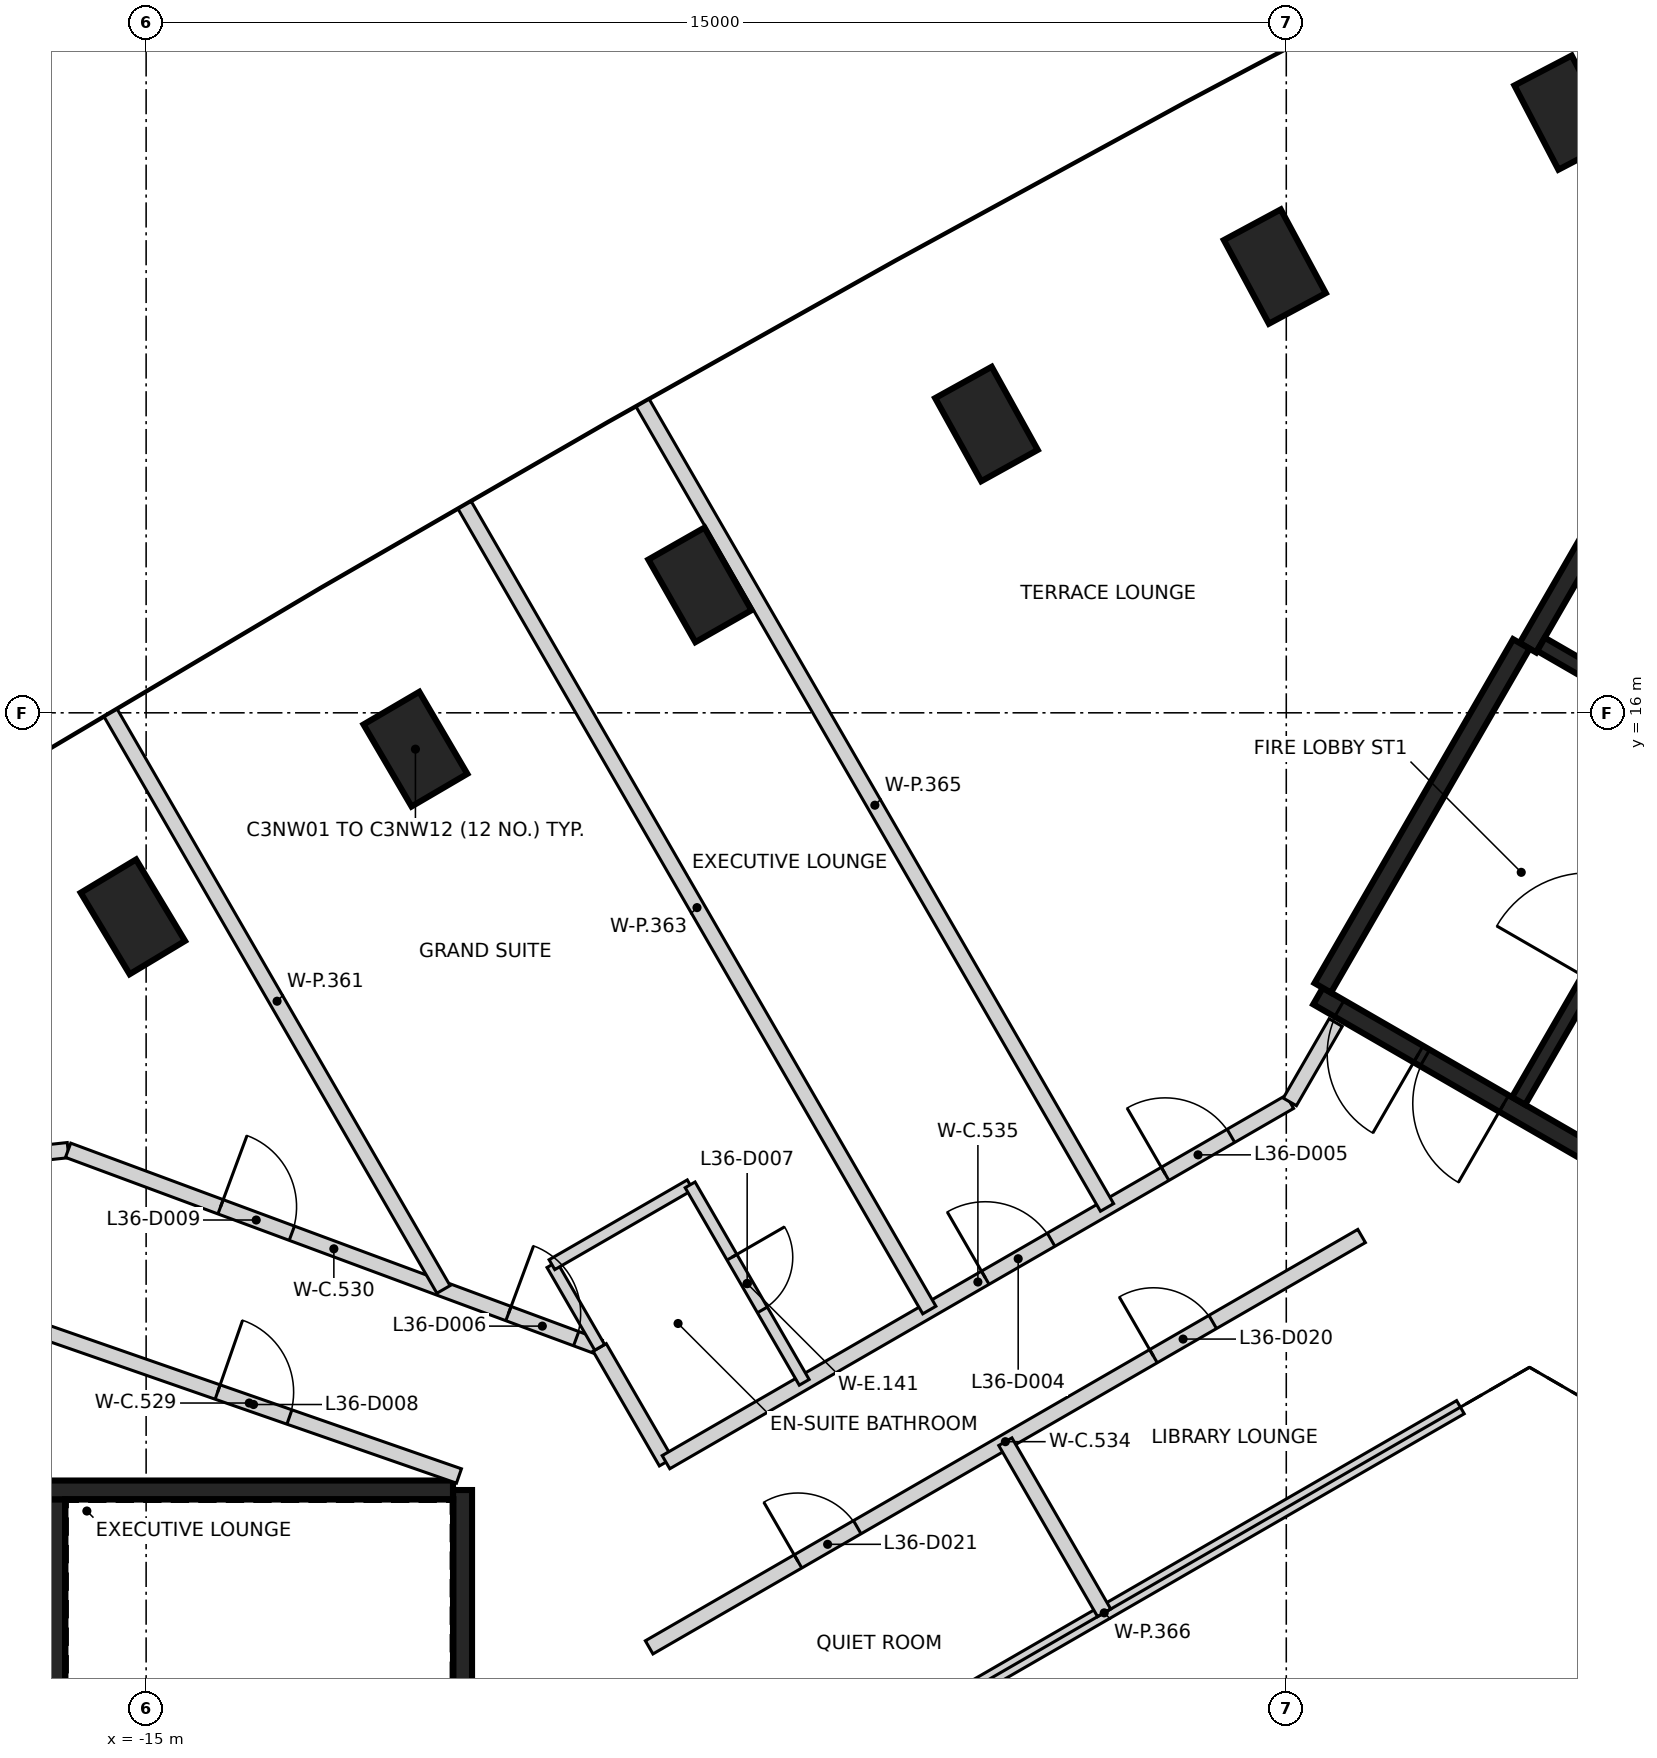
"""IFC4 building model, lengths in metres.
Left out: names, types, materials, properties, quantities, classifications, styles, units other than length and angle.
Written with IfcOpenShell. Run it as: python <this file> out.ifc"""

import sys

from ifc_helpers import new_model, si_unit, direction, frame, frame_2d, origin, origin_2d, place, context, subcontext, project, spatial, rectangle, extrude, element, fill, save


model = new_model("IFC4")
c1 = context("Model", 3, precision=1e-05, world=origin(), true_north=direction((0.0, 1.0)))
c2 = subcontext(c1, "Body", "Model", "MODEL_VIEW")
j1 = project(units=[si_unit("LENGTHUNIT", "METRE"), si_unit("PLANEANGLEUNIT", "RADIAN")], contexts=[c1])
p1 = place(None, origin())
s1 = spatial("IfcSite", under=j1, at=p1, CompositionType="ELEMENT")
p2 = place(p1, origin())
s2 = spatial("IfcBuilding", under=s1, at=p2, CompositionType="ELEMENT")
p3 = place(p2, frame((0.0, 0.0, 146.8)))
s3 = spatial("IfcBuildingStorey", under=s2, at=p3, CompositionType="ELEMENT", Elevation=146.8)
for number, where, z_axis, x_axis in (
    (1, (3.667, 23.896, -0.4), (0.0, 0.0, 1.0), (-0.463, 0.886, 0.0)),
    (2, (-0.151, 21.871, -0.4), (0.0, 0.0, 1.0), (-0.474, 0.881, 0.0)),
    (3, (-3.945, 19.8, -0.4), (0.0, 0.0, 1.0), (-0.485, 0.875, 0.0)),
    (4, (-7.714, 17.683, -0.4), (0.0, 0.0, 1.0), (-0.495, 0.869, 0.0)),
    (5, (-11.457, 15.522, -0.4), (0.0, 0.0, 1.0), (-0.505, 0.863, 0.0)),
    (6, (-15.175, 13.316, -0.4), (0.0, 0.0, 1.0), (-0.515, 0.857, 0.0)),
):
    element("IfcColumn", number, at=place(p3, frame(where, z_axis=z_axis, x_axis=x_axis)), inside=s3, PredefinedType="COLUMN", context=c2, shape_type="SweptSolid", body=[
        extrude(rectangle(XDim=1.25, YDim=0.85, at=origin_2d()), origin(), (0.0, 0.0, 1.0), 3.6),
    ])
p4 = place(p3, frame((-10.837, 5.775, 0.0), z_axis=(0.0, 0.0, 1.0), x_axis=(0.0, -1.0, 0.0)))
e7 = element("IfcWall", 7, at=p4, inside=s3, PredefinedType="SHEAR", context=c2, shape_type="SweptSolid", body=[
    extrude(rectangle(XDim=11.55, YDim=0.25, at=frame_2d((5.775, 0.0))), origin(), (0.0, 0.0, 1.0), 3.2),
])
p5 = place(p4, frame((10.025, 0.0, 0.0)))
e8 = element("IfcOpeningElement", 8, at=p5, cuts=e7, PredefinedType="OPENING", context=c2, shape_type="SweptSolid", body=[
    extrude(rectangle(XDim=1.2, YDim=2.1, at=frame_2d((0.6, 1.05))), frame((0.0, 0.135, 0.0), z_axis=(0.0, -1.0, 0.0), x_axis=(1.0, 0.0, 0.0)), (0.0, 0.0, 1.0), 0.27),
])
p6 = place(p4, frame((8.725, 0.0, 0.0)))
e9 = element("IfcOpeningElement", 9, at=p6, cuts=e7, PredefinedType="OPENING", context=c2, shape_type="SweptSolid", body=[
    extrude(rectangle(XDim=1.2, YDim=2.1, at=frame_2d((0.6, 1.05))), frame((0.0, 0.135, 0.0), z_axis=(0.0, -1.0, 0.0), x_axis=(1.0, 0.0, 0.0)), (0.0, 0.0, 1.0), 0.27),
])
p7 = place(p3, frame((-16.472, 5.775, 0.0), z_axis=(0.0, 0.0, 1.0), x_axis=(1.0, 0.0, 0.0)))
e10 = element("IfcWall", 10, at=p7, inside=s3, PredefinedType="SHEAR", context=c2, shape_type="SweptSolid", body=[
    extrude(rectangle(XDim=5.51, YDim=0.25, at=frame_2d((2.755, 0.0))), origin(), (0.0, 0.0, 1.0), 3.2),
])
p8 = place(p3, frame((-16.187, 3.2, 0.0), z_axis=(0.0, 0.0, 1.0), x_axis=(0.0, 1.0, 0.0)))
e11 = element("IfcWall", 11, at=p8, inside=s3, PredefinedType="SHEAR", context=c2, shape_type="SweptSolid", body=[
    extrude(rectangle(XDim=2.449, YDim=0.25, at=frame_2d((1.225, 0.0))), origin(), (0.0, 0.0, 1.0), 3.2),
])
p9 = place(p3, frame((10.42, 6.498, 0.0), z_axis=(0.0, 0.0, 1.0), x_axis=(-0.866021906294, 0.500006057782, 0.0)))
e12 = element("IfcWall", 12, at=p9, inside=s3, PredefinedType="SHEAR", context=c2, shape_type="SweptSolid", body=[
    extrude(rectangle(XDim=11.55, YDim=0.25, at=frame_2d((5.775, 0.0))), origin(), (0.0, 0.0, 1.0), 3.2),
])
p10 = place(p9, frame((10.025, 0.0, 0.0)))
e13 = element("IfcOpeningElement", 13, at=p10, cuts=e12, PredefinedType="OPENING", context=c2, shape_type="SweptSolid", body=[
    extrude(rectangle(XDim=1.2, YDim=2.1, at=frame_2d((0.6, 1.05))), frame((0.0, 0.135, 0.0), z_axis=(0.0, -1.0, 0.0), x_axis=(1.0, 0.0, 0.0)), (0.0, 0.0, 1.0), 0.27),
])
p11 = place(p9, frame((8.725, 0.0, 0.0)))
e14 = element("IfcOpeningElement", 14, at=p11, cuts=e12, PredefinedType="OPENING", context=c2, shape_type="SweptSolid", body=[
    extrude(rectangle(XDim=1.2, YDim=2.1, at=frame_2d((0.6, 1.05))), frame((0.0, 0.135, 0.0), z_axis=(0.0, -1.0, 0.0), x_axis=(1.0, 0.0, 0.0)), (0.0, 0.0, 1.0), 0.27),
])
p12 = place(p3, frame((3.179, 16.856, 0.0), z_axis=(0.0, 0.0, 1.0), x_axis=(0.500004234368, 0.866022959057, 0.0)))
e15 = element("IfcWall", 15, at=p12, inside=s3, PredefinedType="SHEAR", context=c2, shape_type="SweptSolid", body=[
    extrude(rectangle(XDim=6.25, YDim=0.25, at=frame_2d((3.125, 0.0))), origin(), (0.0, 0.0, 1.0), 3.2),
])
p13 = place(p3, frame((0.48, 12.381, 0.0), z_axis=(0.0, 0.0, 1.0), x_axis=(0.49999885962, 0.866026062182, 0.0)))
e16 = element("IfcWall", 16, at=p13, inside=s3, PredefinedType="SHEAR", context=c2, shape_type="SweptSolid", body=[
    extrude(rectangle(XDim=5.225, YDim=0.25, at=frame_2d((2.612, 0.0))), origin(), (0.0, 0.0, 1.0), 3.2),
])
p14 = place(p3, frame((3.057, 10.895, 0.0), z_axis=(0.0, 0.0, 1.0), x_axis=(0.499989418164, 0.866031513124, 0.0)))
e17 = element("IfcWall", 17, at=p14, inside=s3, PredefinedType="SHEAR", context=c2, shape_type="SweptSolid", body=[
    extrude(rectangle(XDim=5.251, YDim=0.2, at=frame_2d((2.625, 0.0))), origin(), (0.0, 0.0, 1.0), 3.2),
])
p15 = place(p14, frame((1.849, 0.0, 0.0)))
e18 = element("IfcOpeningElement", 18, at=p15, cuts=e17, PredefinedType="OPENING", context=c2, shape_type="SweptSolid", body=[
    extrude(rectangle(XDim=1.4, YDim=2.1, at=frame_2d((0.7, 1.05))), frame((0.0, 0.11, 0.0), z_axis=(0.0, -1.0, 0.0), x_axis=(1.0, 0.0, 0.0)), (0.0, 0.0, 1.0), 0.22),
])
p16 = place(p3, frame((5.725, 15.531, 0.0), z_axis=(0.0, 0.0, 1.0), x_axis=(-0.866037306777, 0.499979382845, 0.0)))
e19 = element("IfcWall", 19, at=p16, inside=s3, PredefinedType="SHEAR", context=c2, shape_type="SweptSolid", body=[
    extrude(rectangle(XDim=2.742, YDim=0.2, at=frame_2d((1.371, 0.0))), origin(), (0.0, 0.0, 1.0), 3.2),
])
p17 = place(p16, frame((0.743, 0.0, 0.0)))
e20 = element("IfcOpeningElement", 20, at=p17, cuts=e19, PredefinedType="OPENING", context=c2, shape_type="SweptSolid", body=[
    extrude(rectangle(XDim=1.3, YDim=2.1, at=frame_2d((0.65, 1.05))), frame((0.0, 0.11, 0.0), z_axis=(0.0, -1.0, 0.0), x_axis=(1.0, 0.0, 0.0)), (0.0, 0.0, 1.0), 0.22),
])
p18 = place(p3, frame((-18.865, 9.941, 0.0), z_axis=(0.0, 0.0, 1.0), x_axis=(0.99423123086, 0.107257911519, 0.0)))
e21 = element("IfcWall", 21, at=p18, inside=s3, PredefinedType="PARTITIONING", context=c2, shape_type="SweptSolid", body=[
    extrude(rectangle(XDim=2.854, YDim=0.2, at=frame_2d((1.427, 0.0))), origin(), (0.0, 0.0, 1.0), 3.2),
])
p19 = place(p3, frame((-16.402, 7.879, 0.0), z_axis=(0.0, 0.0, 1.0), x_axis=(0.94449961557, -0.328512520596, 0.0)))
e22 = element("IfcWall", 22, at=p19, inside=s3, PredefinedType="PARTITIONING", context=c2, shape_type="SweptSolid", body=[
    extrude(rectangle(XDim=5.842, YDim=0.2, at=frame_2d((2.921, 0.0))), origin(), (0.0, 0.0, 1.0), 3.2),
])
p20 = place(p19, frame((2.481, 0.0, 0.0)))
e23 = element("IfcOpeningElement", 23, at=p20, cuts=e22, PredefinedType="OPENING", context=c2, shape_type="SweptSolid", body=[
    extrude(rectangle(XDim=1.0, YDim=2.1, at=frame_2d((0.5, 1.05))), frame((0.0, 0.11, 0.0), z_axis=(0.0, -1.0, 0.0), x_axis=(1.0, 0.0, 0.0)), (0.0, 0.0, 1.0), 0.22),
])
p21 = place(p3, frame((-16.026, 10.245, 0.0), z_axis=(0.0, 0.0, 1.0), x_axis=(0.937607706988, -0.347694963721, 0.0)))
e24 = element("IfcWall", 24, at=p21, inside=s3, PredefinedType="PARTITIONING", context=c2, shape_type="SweptSolid", body=[
    extrude(rectangle(XDim=7.458, YDim=0.2, at=frame_2d((3.729, 0.0))), origin(), (0.0, 0.0, 1.0), 3.2),
])
p22 = place(p21, frame((6.179, 0.0, 0.0)))
e25 = element("IfcOpeningElement", 25, at=p22, cuts=e24, PredefinedType="OPENING", context=c2, shape_type="SweptSolid", body=[
    extrude(rectangle(XDim=0.95, YDim=2.1, at=frame_2d((0.475, 1.05))), frame((0.0, 0.11, 0.0), z_axis=(0.0, -1.0, 0.0), x_axis=(1.0, 0.0, 0.0)), (0.0, 0.0, 1.0), 0.22),
])
p23 = place(p21, frame((2.139, 0.0, 0.0)))
e26 = element("IfcOpeningElement", 26, at=p23, cuts=e24, PredefinedType="OPENING", context=c2, shape_type="SweptSolid", body=[
    extrude(rectangle(XDim=1.0, YDim=2.1, at=frame_2d((0.5, 1.05))), frame((0.0, 0.11, 0.0), z_axis=(0.0, -1.0, 0.0), x_axis=(1.0, 0.0, 0.0)), (0.0, 0.0, 1.0), 0.22),
])
p24 = place(p3, frame((-9.033, 7.651, 0.0), z_axis=(0.0, 0.0, 1.0), x_axis=(0.500417633986, -0.865784148386, 0.0)))
e27 = element("IfcWall", 27, at=p24, inside=s3, PredefinedType="PARTITIONING", context=c2, shape_type="SweptSolid", body=[
    extrude(rectangle(XDim=1.743, YDim=0.2, at=frame_2d((0.871, 0.0))), origin(), (0.0, 0.0, 1.0), 3.2),
])
p25 = place(p3, frame((-8.382, 3.705, 0.0), z_axis=(0.0, 0.0, 1.0), x_axis=(0.866012036978, 0.500023151273, 0.0)))
e28 = element("IfcWall", 28, at=p25, inside=s3, PredefinedType="PARTITIONING", context=c2, shape_type="SweptSolid", body=[
    extrude(rectangle(XDim=10.823, YDim=0.2, at=frame_2d((5.412, 0.0))), origin(), (0.0, 0.0, 1.0), 3.2),
])
p26 = place(p25, frame((7.661, 0.0, 0.0)))
e29 = element("IfcOpeningElement", 29, at=p26, cuts=e28, PredefinedType="OPENING", context=c2, shape_type="SweptSolid", body=[
    extrude(rectangle(XDim=0.9, YDim=2.1, at=frame_2d((0.45, 1.05))), frame((0.0, 0.11, 0.0), z_axis=(0.0, -1.0, 0.0), x_axis=(1.0, 0.0, 0.0)), (0.0, 0.0, 1.0), 0.22),
])
p27 = place(p25, frame((2.261, 0.0, 0.0)))
e30 = element("IfcOpeningElement", 30, at=p27, cuts=e28, PredefinedType="OPENING", context=c2, shape_type="SweptSolid", body=[
    extrude(rectangle(XDim=0.9, YDim=2.1, at=frame_2d((0.45, 1.05))), frame((0.0, 0.11, 0.0), z_axis=(0.0, -1.0, 0.0), x_axis=(1.0, 0.0, 0.0)), (0.0, 0.0, 1.0), 0.22),
])
p28 = place(p3, frame((-8.161, 6.142, 0.0), z_axis=(0.0, 0.0, 1.0), x_axis=(0.865927304867, 0.500169873828, 0.0)))
e31 = element("IfcWall", 31, at=p28, inside=s3, PredefinedType="PARTITIONING", context=c2, shape_type="SweptSolid", body=[
    extrude(rectangle(XDim=9.478, YDim=0.2, at=frame_2d((4.739, 0.0))), origin(), (0.0, 0.0, 1.0), 3.2),
])
p29 = place(p28, frame((4.851, 0.0, 0.0)))
e32 = element("IfcOpeningElement", 32, at=p29, cuts=e31, PredefinedType="OPENING", context=c2, shape_type="SweptSolid", body=[
    extrude(rectangle(XDim=1.0, YDim=2.1, at=frame_2d((0.5, 1.05))), frame((0.0, 0.11, 0.0), z_axis=(0.0, -1.0, 0.0), x_axis=(1.0, 0.0, 0.0)), (0.0, 0.0, 1.0), 0.22),
])
p30 = place(p28, frame((7.583, 0.0, 0.0)))
e33 = element("IfcOpeningElement", 33, at=p30, cuts=e31, PredefinedType="OPENING", context=c2, shape_type="SweptSolid", body=[
    extrude(rectangle(XDim=1.0, YDim=2.1, at=frame_2d((0.5, 1.05))), frame((0.0, 0.11, 0.0), z_axis=(0.0, -1.0, 0.0), x_axis=(1.0, 0.0, 0.0)), (0.0, 0.0, 1.0), 0.22),
])
p31 = place(p3, frame((0.047, 10.881, 0.0), z_axis=(0.0, 0.0, 1.0), x_axis=(0.500038011057, 0.866003456978, 0.0)))
e34 = element("IfcWall", 34, at=p31, inside=s3, PredefinedType="PARTITIONING", context=c2, shape_type="SweptSolid", body=[
    extrude(rectangle(XDim=1.206, YDim=0.2, at=frame_2d((0.603, 0.0))), origin(), (0.0, 0.0, 1.0), 3.2),
])
p32 = place(p3, frame((-15.467, 15.998, 0.0), z_axis=(0.0, 0.0, 1.0), x_axis=(0.500003998589, -0.866023095186, 0.0)))
e35 = element("IfcWall", 35, at=p32, inside=s3, PredefinedType="PARTITIONING", context=c2, shape_type="SweptSolid", body=[
    extrude(rectangle(XDim=8.757, YDim=0.2, at=frame_2d((4.379, 0.0))), origin(), (0.0, 0.0, 1.0), 2.3),
])
p33 = place(p3, frame((-10.809, 18.731, 0.0), z_axis=(0.0, 0.0, 1.0), x_axis=(0.500004774777, -0.866022647048, 0.0)))
e36 = element("IfcWall", 36, at=p33, inside=s3, PredefinedType="PARTITIONING", context=c2, shape_type="SweptSolid", body=[
    extrude(rectangle(XDim=12.227, YDim=0.2, at=frame_2d((6.113, 0.0))), origin(), (0.0, 0.0, 1.0), 2.3),
])
p34 = place(p3, frame((-8.468, 20.076, 0.0), z_axis=(0.0, 0.0, 1.0), x_axis=(0.499961688474, -0.866047521824, 0.0)))
e37 = element("IfcWall", 37, at=p34, inside=s3, PredefinedType="PARTITIONING", context=c2, shape_type="SweptSolid", body=[
    extrude(rectangle(XDim=12.22, YDim=0.2, at=frame_2d((6.11, 0.0))), origin(), (0.0, 0.0, 1.0), 2.3),
])
p35 = place(p3, frame((-7.082, 1.453, 0.0), z_axis=(0.0, 0.0, 1.0), x_axis=(0.866010525116, 0.500025769724, 0.0)))
e38 = element("IfcWall", 38, at=p35, inside=s3, PredefinedType="PARTITIONING", context=c2, shape_type="SweptSolid", body=[
    extrude(rectangle(XDim=10.823, YDim=0.2, at=frame_2d((5.411, 0.0))), origin(), (0.0, 0.0, 1.0), 2.3),
])
p36 = place(p3, frame((-3.696, 6.411, 0.0), z_axis=(0.0, 0.0, 1.0), x_axis=(0.500006934395, -0.866021400173, 0.0)))
e39 = element("IfcWall", 39, at=p36, inside=s3, PredefinedType="PARTITIONING", context=c2, shape_type="SweptSolid", body=[
    extrude(rectangle(XDim=2.6, YDim=0.2, at=frame_2d((1.3, 0.0))), origin(), (0.0, 0.0, 1.0), 2.3),
])
p37 = place(p3, frame((-9.661, 8.74, 0.0), z_axis=(0.0, 0.0, 1.0), x_axis=(0.49990192124, -0.866082022179, 0.0)))
e40 = element("IfcWall", 40, at=p37, inside=s3, PredefinedType="PARTITIONING", context=c2, shape_type="SweptSolid", body=[
    extrude(rectangle(XDim=1.256, YDim=0.15, at=frame_2d((0.628, 0.0))), origin(), (0.0, 0.0, 1.0), 3.2),
])
p38 = place(p3, frame((-9.661, 8.74, 0.0), z_axis=(0.0, 0.0, 1.0), x_axis=(0.865922159541, 0.500178781653, 0.0)))
e41 = element("IfcWall", 41, at=p38, inside=s3, PredefinedType="PARTITIONING", context=c2, shape_type="SweptSolid", body=[
    extrude(rectangle(XDim=2.099, YDim=0.15, at=frame_2d((1.05, 0.0))), origin(), (0.0, 0.0, 1.0), 3.2),
])
p39 = place(p3, frame((-7.843, 9.79, 0.0), z_axis=(0.0, 0.0, 1.0), x_axis=(0.500234218456, -0.865890135459, 0.0)))
e42 = element("IfcWall", 42, at=p39, inside=s3, PredefinedType="PARTITIONING", context=c2, shape_type="SweptSolid", body=[
    extrude(rectangle(XDim=3.0, YDim=0.15, at=frame_2d((1.5, 0.0))), origin(), (0.0, 0.0, 1.0), 3.2),
])
p40 = place(p39, frame((1.1, 0.0, 0.0)))
e43 = element("IfcOpeningElement", 43, at=p40, cuts=e42, PredefinedType="OPENING", context=c2, shape_type="SweptSolid", body=[
    extrude(rectangle(XDim=0.8, YDim=2.1, at=frame_2d((0.4, 1.05))), frame((0.0, 0.085, 0.0), z_axis=(0.0, -1.0, 0.0), x_axis=(1.0, 0.0, 0.0)), (0.0, 0.0, 1.0), 0.17),
])
p41 = place(p10, origin())
e44 = element("IfcDoor", 44, at=p41, inside=s3, OperationType="SINGLE_SWING_LEFT", PredefinedType="DOOR", context=c2, shape_type="SweptSolid", body=[
    extrude(rectangle(XDim=1.2, YDim=2.1, at=frame_2d((0.6, 1.05))), frame((0.0, 0.025, 0.0), z_axis=(0.0, -1.0, 0.0), x_axis=(1.0, 0.0, 0.0)), (0.0, 0.0, 1.0), 0.05),
])
fill(e13, e44)
p42 = place(p11, origin())
e45 = element("IfcDoor", 45, at=p42, inside=s3, OperationType="SINGLE_SWING_RIGHT", PredefinedType="DOOR", context=c2, shape_type="SweptSolid", body=[
    extrude(rectangle(XDim=1.2, YDim=2.1, at=frame_2d((0.6, 1.05))), frame((0.0, 0.025, 0.0), z_axis=(0.0, -1.0, 0.0), x_axis=(1.0, 0.0, 0.0)), (0.0, 0.0, 1.0), 0.05),
])
fill(e14, e45)
p43 = place(p29, origin())
e46 = element("IfcDoor", 46, at=p43, inside=s3, OperationType="SINGLE_SWING_LEFT", PredefinedType="DOOR", context=c2, shape_type="SweptSolid", body=[
    extrude(rectangle(XDim=1.0, YDim=2.1, at=frame_2d((0.5, 1.05))), frame((0.0, 0.025, 0.0), z_axis=(0.0, -1.0, 0.0), x_axis=(1.0, 0.0, 0.0)), (0.0, 0.0, 1.0), 0.05),
])
fill(e32, e46)
p44 = place(p30, origin())
e47 = element("IfcDoor", 47, at=p44, inside=s3, OperationType="SINGLE_SWING_LEFT", PredefinedType="DOOR", context=c2, shape_type="SweptSolid", body=[
    extrude(rectangle(XDim=1.0, YDim=2.1, at=frame_2d((0.5, 1.05))), frame((0.0, 0.025, 0.0), z_axis=(0.0, -1.0, 0.0), x_axis=(1.0, 0.0, 0.0)), (0.0, 0.0, 1.0), 0.05),
])
fill(e33, e47)
p45 = place(p22, origin())
e48 = element("IfcDoor", 48, at=p45, inside=s3, OperationType="SINGLE_SWING_LEFT", PredefinedType="DOOR", context=c2, shape_type="SweptSolid", body=[
    extrude(rectangle(XDim=0.95, YDim=2.1, at=frame_2d((0.475, 1.05))), frame((0.0, 0.025, 0.0), z_axis=(0.0, -1.0, 0.0), x_axis=(1.0, 0.0, 0.0)), (0.0, 0.0, 1.0), 0.05),
])
fill(e25, e48)
p46 = place(p40, frame((0.8, 0.0, 0.0), z_axis=(0.0, 0.0, 1.0), x_axis=(-1.0, 0.0, 0.0)))
e49 = element("IfcDoor", 49, at=p46, inside=s3, OperationType="SINGLE_SWING_LEFT", PredefinedType="DOOR", context=c2, shape_type="SweptSolid", body=[
    extrude(rectangle(XDim=0.8, YDim=2.1, at=frame_2d((0.4, 1.05))), frame((0.0, 0.025, 0.0), z_axis=(0.0, -1.0, 0.0), x_axis=(1.0, 0.0, 0.0)), (0.0, 0.0, 1.0), 0.05),
])
fill(e43, e49)
p47 = place(p20, frame((1.0, 0.0, 0.0), z_axis=(0.0, 0.0, 1.0), x_axis=(-1.0, 0.0, 0.0)))
e50 = element("IfcDoor", 50, at=p47, inside=s3, OperationType="SINGLE_SWING_LEFT", PredefinedType="DOOR", context=c2, shape_type="SweptSolid", body=[
    extrude(rectangle(XDim=1.0, YDim=2.1, at=frame_2d((0.5, 1.05))), frame((0.0, 0.025, 0.0), z_axis=(0.0, -1.0, 0.0), x_axis=(1.0, 0.0, 0.0)), (0.0, 0.0, 1.0), 0.05),
])
fill(e23, e50)
p48 = place(p23, frame((1.0, 0.0, 0.0), z_axis=(0.0, 0.0, 1.0), x_axis=(-1.0, 0.0, 0.0)))
e51 = element("IfcDoor", 51, at=p48, inside=s3, OperationType="SINGLE_SWING_LEFT", PredefinedType="DOOR", context=c2, shape_type="SweptSolid", body=[
    extrude(rectangle(XDim=1.0, YDim=2.1, at=frame_2d((0.5, 1.05))), frame((0.0, 0.025, 0.0), z_axis=(0.0, -1.0, 0.0), x_axis=(1.0, 0.0, 0.0)), (0.0, 0.0, 1.0), 0.05),
])
fill(e26, e51)
p49 = place(p26, frame((0.9, 0.0, 0.0), z_axis=(0.0, 0.0, 1.0), x_axis=(-1.0, 0.0, 0.0)))
e52 = element("IfcDoor", 52, at=p49, inside=s3, OperationType="SINGLE_SWING_LEFT", PredefinedType="DOOR", context=c2, shape_type="SweptSolid", body=[
    extrude(rectangle(XDim=0.9, YDim=2.1, at=frame_2d((0.45, 1.05))), frame((0.0, 0.025, 0.0), z_axis=(0.0, -1.0, 0.0), x_axis=(1.0, 0.0, 0.0)), (0.0, 0.0, 1.0), 0.05),
])
fill(e29, e52)
p50 = place(p27, frame((0.9, 0.0, 0.0), z_axis=(0.0, 0.0, 1.0), x_axis=(-1.0, 0.0, 0.0)))
e53 = element("IfcDoor", 53, at=p50, inside=s3, OperationType="SINGLE_SWING_LEFT", PredefinedType="DOOR", context=c2, shape_type="SweptSolid", body=[
    extrude(rectangle(XDim=0.9, YDim=2.1, at=frame_2d((0.45, 1.05))), frame((0.0, 0.025, 0.0), z_axis=(0.0, -1.0, 0.0), x_axis=(1.0, 0.0, 0.0)), (0.0, 0.0, 1.0), 0.05),
])
fill(e30, e53)
save(model, sys.argv[1])
